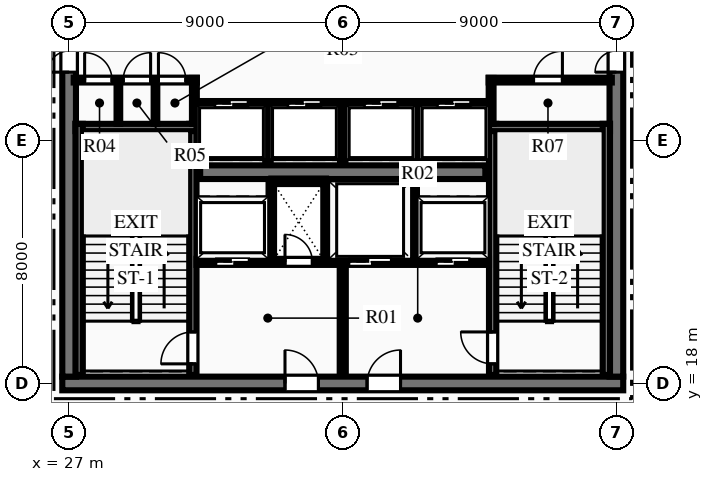
"""IFC4 building model, lengths in metres.
Left out: names, types, materials, properties, quantities, classifications, styles, units other than length and angle.
Written with IfcOpenShell. Run it as: python <this file> out.ifc"""

import sys

from ifc_helpers import new_model, si_unit, direction, frame, frame_2d, origin, place, context, subcontext, project, spatial, rectangle, extrude, element, fill, save


model = new_model("IFC4")
c1 = context("Model", 3, precision=1e-05, world=origin(), true_north=direction((0.0, 1.0)))
c2 = subcontext(c1, "Body", "Model", "MODEL_VIEW")
j1 = project(units=[si_unit("LENGTHUNIT", "METRE"), si_unit("PLANEANGLEUNIT", "RADIAN")], contexts=[c1])
p1 = place(None, origin())
s1 = spatial("IfcSite", under=j1, at=p1, CompositionType="ELEMENT")
p2 = place(p1, origin())
s2 = spatial("IfcBuilding", under=s1, at=p2, CompositionType="ELEMENT")
p3 = place(p2, frame((0.0, 0.0, 282.45)))
s3 = spatial("IfcBuildingStorey", under=s2, at=p3, CompositionType="ELEMENT", Elevation=282.45)
p4 = place(p3, frame((26.775, 18.0, 0.0), z_axis=(0.0, 0.0, 1.0), x_axis=(1.0, 0.0, 0.0)))
e1 = element("IfcWall", 1, at=p4, inside=s3, PredefinedType="SHEAR", context=c2, shape_type="SweptSolid", body=[
    extrude(rectangle(XDim=18.45, YDim=0.45, at=frame_2d((9.225, 0.0))), origin(), (0.0, 0.0, 1.0), 3.75),
])
p5 = place(p4, frame((7.325, 0.0, 0.0)))
e2 = element("IfcOpeningElement", 2, at=p5, cuts=e1, PredefinedType="OPENING", context=c2, shape_type="SweptSolid", body=[
    extrude(rectangle(XDim=1.1, YDim=2.15, at=frame_2d((0.55, 1.075))), frame((0.0, 0.235, 0.0), z_axis=(0.0, -1.0, 0.0), x_axis=(1.0, 0.0, 0.0)), (0.0, 0.0, 1.0), 0.47),
])
p6 = place(p4, frame((10.025, 0.0, 0.0)))
e3 = element("IfcOpeningElement", 3, at=p6, cuts=e1, PredefinedType="OPENING", context=c2, shape_type="SweptSolid", body=[
    extrude(rectangle(XDim=1.1, YDim=2.15, at=frame_2d((0.55, 1.075))), frame((0.0, 0.235, 0.0), z_axis=(0.0, -1.0, 0.0), x_axis=(1.0, 0.0, 0.0)), (0.0, 0.0, 1.0), 0.47),
])
p7 = place(p3, frame((27.0, 18.225, 0.0), z_axis=(0.0, 0.0, 1.0), x_axis=(0.0, 1.0, 0.0)))
e4 = element("IfcWall", 4, at=p7, inside=s3, PredefinedType="SHEAR", context=c2, shape_type="SweptSolid", body=[
    extrude(rectangle(XDim=15.55, YDim=0.45, at=frame_2d((7.775, 0.0))), origin(), (0.0, 0.0, 1.0), 3.75),
])
p8 = place(p7, frame((10.015, 0.0, 0.0)))
e5 = element("IfcOpeningElement", 5, at=p8, cuts=e4, PredefinedType="OPENING", context=c2, shape_type="SweptSolid", body=[
    extrude(rectangle(XDim=1.4, YDim=2.2, at=frame_2d((0.7, 1.1))), frame((0.0, 0.235, 0.0), z_axis=(0.0, -1.0, 0.0), x_axis=(1.0, 0.0, 0.0)), (0.0, 0.0, 1.0), 0.47),
])
p9 = place(p3, frame((45.0, 18.225, 0.0), z_axis=(0.0, 0.0, 1.0), x_axis=(0.0, 1.0, 0.0)))
e6 = element("IfcWall", 6, at=p9, inside=s3, PredefinedType="SHEAR", context=c2, shape_type="SweptSolid", body=[
    extrude(rectangle(XDim=15.55, YDim=0.45, at=frame_2d((7.775, 0.0))), origin(), (0.0, 0.0, 1.0), 3.75),
])
p10 = place(p9, frame((10.015, 0.0, 0.0)))
e7 = element("IfcOpeningElement", 7, at=p10, cuts=e6, PredefinedType="OPENING", context=c2, shape_type="SweptSolid", body=[
    extrude(rectangle(XDim=1.4, YDim=2.2, at=frame_2d((0.7, 1.1))), frame((0.0, 0.235, 0.0), z_axis=(0.0, -1.0, 0.0), x_axis=(1.0, 0.0, 0.0)), (0.0, 0.0, 1.0), 0.47),
])
p11 = place(p3, frame((31.31, 24.95, 0.0), z_axis=(0.0, 0.0, 1.0), x_axis=(1.0, 0.0, 0.0)))
e8 = element("IfcWall", 8, at=p11, inside=s3, PredefinedType="SHEAR", context=c2, shape_type="SweptSolid", body=[
    extrude(rectangle(XDim=9.38, YDim=0.45, at=frame_2d((4.69, 0.0))), origin(), (0.0, 0.0, 1.0), 3.75),
])
p12 = place(p3, frame((31.07, 18.28, 0.0), z_axis=(0.0, 0.0, 1.0), x_axis=(0.0, 1.0, 0.0)))
e9 = element("IfcWall", 9, at=p12, inside=s3, PredefinedType="SHEAR", context=c2, shape_type="SweptSolid", body=[
    extrude(rectangle(XDim=8.26, YDim=0.24, at=frame_2d((4.13, 0.0))), origin(), (0.0, 0.0, 1.0), 3.75),
])
p13 = place(p12, frame((0.365, 0.0, 0.0)))
e10 = element("IfcOpeningElement", 10, at=p13, cuts=e9, PredefinedType="OPENING", context=c2, shape_type="SweptSolid", body=[
    extrude(rectangle(XDim=1.05, YDim=2.15, at=frame_2d((0.525, 1.075))), frame((0.0, 0.13, 0.0), z_axis=(0.0, -1.0, 0.0), x_axis=(1.0, 0.0, 0.0)), (0.0, 0.0, 1.0), 0.26),
])
p14 = place(p3, frame((27.21, 26.42, 0.0), z_axis=(0.0, 0.0, 1.0), x_axis=(1.0, 0.0, 0.0)))
e11 = element("IfcWall", 11, at=p14, inside=s3, PredefinedType="SHEAR", context=c2, shape_type="SweptSolid", body=[
    extrude(rectangle(XDim=3.98, YDim=0.24, at=frame_2d((1.99, 0.0))), origin(), (0.0, 0.0, 1.0), 3.75),
])
p15 = place(p3, frame((27.33, 18.28, 0.0), z_axis=(0.0, 0.0, 1.0), x_axis=(0.0, 1.0, 0.0)))
e12 = element("IfcWall", 12, at=p15, inside=s3, PredefinedType="SHEAR", context=c2, shape_type="SweptSolid", body=[
    extrude(rectangle(XDim=8.26, YDim=0.24, at=frame_2d((4.13, 0.0))), origin(), (0.0, 0.0, 1.0), 3.75),
])
p16 = place(p3, frame((40.93, 18.28, 0.0), z_axis=(0.0, 0.0, 1.0), x_axis=(0.0, 1.0, 0.0)))
e13 = element("IfcWall", 13, at=p16, inside=s3, PredefinedType="SHEAR", context=c2, shape_type="SweptSolid", body=[
    extrude(rectangle(XDim=8.26, YDim=0.24, at=frame_2d((4.13, 0.0))), origin(), (0.0, 0.0, 1.0), 3.75),
])
p17 = place(p16, frame((0.365, 0.0, 0.0)))
e14 = element("IfcOpeningElement", 14, at=p17, cuts=e13, PredefinedType="OPENING", context=c2, shape_type="SweptSolid", body=[
    extrude(rectangle(XDim=1.05, YDim=2.15, at=frame_2d((0.525, 1.075))), frame((0.0, 0.13, 0.0), z_axis=(0.0, -1.0, 0.0), x_axis=(1.0, 0.0, 0.0)), (0.0, 0.0, 1.0), 0.26),
])
p18 = place(p3, frame((40.81, 26.42, 0.0), z_axis=(0.0, 0.0, 1.0), x_axis=(1.0, 0.0, 0.0)))
e15 = element("IfcWall", 15, at=p18, inside=s3, PredefinedType="SHEAR", context=c2, shape_type="SweptSolid", body=[
    extrude(rectangle(XDim=3.98, YDim=0.24, at=frame_2d((1.99, 0.0))), origin(), (0.0, 0.0, 1.0), 3.75),
])
p19 = place(p3, frame((44.67, 18.28, 0.0), z_axis=(0.0, 0.0, 1.0), x_axis=(0.0, 1.0, 0.0)))
e16 = element("IfcWall", 16, at=p19, inside=s3, PredefinedType="SHEAR", context=c2, shape_type="SweptSolid", body=[
    extrude(rectangle(XDim=8.26, YDim=0.24, at=frame_2d((4.13, 0.0))), origin(), (0.0, 0.0, 1.0), 3.75),
])
p20 = place(p3, frame((36.0, 18.28, 0.0), z_axis=(0.0, 0.0, 1.0), x_axis=(0.0, 1.0, 0.0)))
e17 = element("IfcWall", 17, at=p20, inside=s3, PredefinedType="PARTITIONING", context=c2, shape_type="SweptSolid", body=[
    extrude(rectangle(XDim=3.77, YDim=0.2, at=frame_2d((1.885, 0.0))), origin(), (0.0, 0.0, 1.0), 3.48),
])
p21 = place(p3, frame((31.19, 22.0, 0.0), z_axis=(0.0, 0.0, 1.0), x_axis=(1.0, 0.0, 0.0)))
e18 = element("IfcWall", 18, at=p21, inside=s3, PredefinedType="PARTITIONING", context=c2, shape_type="SweptSolid", body=[
    extrude(rectangle(XDim=4.69, YDim=0.2, at=frame_2d((2.345, 0.0))), origin(), (0.0, 0.0, 1.0), 3.48),
])
p22 = place(p21, frame((2.91, 0.0, 0.0)))
e19 = element("IfcOpeningElement", 19, at=p22, cuts=e18, PredefinedType="OPENING", context=c2, shape_type="SweptSolid", body=[
    extrude(rectangle(XDim=0.9, YDim=2.15, at=frame_2d((0.45, 1.075))), frame((0.0, 0.11, 0.0), z_axis=(0.0, -1.0, 0.0), x_axis=(1.0, 0.0, 0.0)), (0.0, 0.0, 1.0), 0.22),
])
p23 = place(p21, frame((0.635, 0.0, 0.0)))
e20 = element("IfcOpeningElement", 20, at=p23, cuts=e18, PredefinedType="OPENING", context=c2, shape_type="SweptSolid", body=[
    extrude(rectangle(XDim=1.1, YDim=2.15, at=frame_2d((0.55, 1.075))), frame((0.0, 0.11, 0.0), z_axis=(0.0, -1.0, 0.0), x_axis=(1.0, 0.0, 0.0)), (0.0, 0.0, 1.0), 0.22),
])
p24 = place(p3, frame((36.12, 22.0, 0.0), z_axis=(0.0, 0.0, 1.0), x_axis=(1.0, 0.0, 0.0)))
e21 = element("IfcWall", 21, at=p24, inside=s3, PredefinedType="PARTITIONING", context=c2, shape_type="SweptSolid", body=[
    extrude(rectangle(XDim=4.69, YDim=0.2, at=frame_2d((2.345, 0.0))), origin(), (0.0, 0.0, 1.0), 3.48),
])
p25 = place(p24, frame((2.955, 0.0, 0.0)))
e22 = element("IfcOpeningElement", 22, at=p25, cuts=e21, PredefinedType="OPENING", context=c2, shape_type="SweptSolid", body=[
    extrude(rectangle(XDim=1.1, YDim=2.15, at=frame_2d((0.55, 1.075))), frame((0.0, 0.11, 0.0), z_axis=(0.0, -1.0, 0.0), x_axis=(1.0, 0.0, 0.0)), (0.0, 0.0, 1.0), 0.22),
])
p26 = place(p24, frame((0.08, 0.0, 0.0)))
e23 = element("IfcOpeningElement", 23, at=p26, cuts=e21, PredefinedType="OPENING", context=c2, shape_type="SweptSolid", body=[
    extrude(rectangle(XDim=1.4, YDim=2.2, at=frame_2d((0.7, 1.1))), frame((0.0, 0.11, 0.0), z_axis=(0.0, -1.0, 0.0), x_axis=(1.0, 0.0, 0.0)), (0.0, 0.0, 1.0), 0.22),
])
for number, where, z_axis, x_axis in (
    (24, (33.65, 22.05, 0.0), (0.0, 0.0, 1.0), (0.0, 1.0, 0.0)),
    (25, (35.45, 22.05, 0.0), (0.0, 0.0, 1.0), (0.0, 1.0, 0.0)),
):
    element("IfcWall", number, at=place(p3, frame(where, z_axis=z_axis, x_axis=x_axis)), inside=s3, PredefinedType="PARTITIONING", context=c2, shape_type="SweptSolid", body=[
        extrude(rectangle(XDim=2.6, YDim=0.18, at=frame_2d((1.3, 0.0))), origin(), (0.0, 0.0, 1.0), 3.48),
    ])
p27 = place(p3, frame((33.65, 24.65, 0.0), z_axis=(0.0, 0.0, 1.0), x_axis=(1.0, 0.0, 0.0)))
e26 = element("IfcWall", 26, at=p27, inside=s3, PredefinedType="PARTITIONING", context=c2, shape_type="SweptSolid", body=[
    extrude(rectangle(XDim=1.8, YDim=0.18, at=frame_2d((0.9, 0.0))), origin(), (0.0, 0.0, 1.0), 3.48),
])
p28 = place(p3, frame((38.35, 22.05, 0.0), z_axis=(0.0, 0.0, 1.0), x_axis=(0.0, 1.0, 0.0)))
e27 = element("IfcWall", 27, at=p28, inside=s3, PredefinedType="PARTITIONING", context=c2, shape_type="SweptSolid", body=[
    extrude(rectangle(XDim=2.6, YDim=0.18, at=frame_2d((1.3, 0.0))), origin(), (0.0, 0.0, 1.0), 3.48),
])
p29 = place(p3, frame((27.15, 27.98, 0.0), z_axis=(0.0, 0.0, 1.0), x_axis=(1.0, 0.0, 0.0)))
e28 = element("IfcWall", 28, at=p29, inside=s3, PredefinedType="PARTITIONING", context=c2, shape_type="SweptSolid", body=[
    extrude(rectangle(XDim=4.05, YDim=0.16, at=frame_2d((2.025, 0.0))), origin(), (0.0, 0.0, 1.0), 3.48),
])
p30 = place(p29, frame((0.36, 0.0, 0.0)))
e29 = element("IfcOpeningElement", 29, at=p30, cuts=e28, PredefinedType="OPENING", context=c2, shape_type="SweptSolid", body=[
    extrude(rectangle(XDim=0.9, YDim=2.15, at=frame_2d((0.45, 1.075))), frame((0.0, 0.09, 0.0), z_axis=(0.0, -1.0, 0.0), x_axis=(1.0, 0.0, 0.0)), (0.0, 0.0, 1.0), 0.18),
])
p31 = place(p29, frame((1.63, 0.0, 0.0)))
e30 = element("IfcOpeningElement", 30, at=p31, cuts=e28, PredefinedType="OPENING", context=c2, shape_type="SweptSolid", body=[
    extrude(rectangle(XDim=0.9, YDim=2.15, at=frame_2d((0.45, 1.075))), frame((0.0, 0.09, 0.0), z_axis=(0.0, -1.0, 0.0), x_axis=(1.0, 0.0, 0.0)), (0.0, 0.0, 1.0), 0.18),
])
p32 = place(p29, frame((2.788, 0.0, 0.0)))
e31 = element("IfcOpeningElement", 31, at=p32, cuts=e28, PredefinedType="OPENING", context=c2, shape_type="SweptSolid", body=[
    extrude(rectangle(XDim=0.9, YDim=2.15, at=frame_2d((0.45, 1.075))), frame((0.0, 0.09, 0.0), z_axis=(0.0, -1.0, 0.0), x_axis=(1.0, 0.0, 0.0)), (0.0, 0.0, 1.0), 0.18),
])
p33 = place(p3, frame((31.12, 26.54, 0.0), z_axis=(0.0, 0.0, 1.0), x_axis=(0.0, 1.0, 0.0)))
e32 = element("IfcWall", 32, at=p33, inside=s3, PredefinedType="PARTITIONING", context=c2, shape_type="SweptSolid", body=[
    extrude(rectangle(XDim=1.51, YDim=0.16, at=frame_2d((0.755, 0.0))), origin(), (0.0, 0.0, 1.0), 3.48),
])
p34 = place(p3, frame((40.8, 27.98, 0.0), z_axis=(0.0, 0.0, 1.0), x_axis=(1.0, 0.0, 0.0)))
e33 = element("IfcWall", 33, at=p34, inside=s3, PredefinedType="PARTITIONING", context=c2, shape_type="SweptSolid", body=[
    extrude(rectangle(XDim=4.05, YDim=0.16, at=frame_2d((2.025, 0.0))), origin(), (0.0, 0.0, 1.0), 3.48),
])
p35 = place(p34, frame((1.475, 0.0, 0.0)))
e34 = element("IfcOpeningElement", 34, at=p35, cuts=e33, PredefinedType="OPENING", context=c2, shape_type="SweptSolid", body=[
    extrude(rectangle(XDim=0.95, YDim=2.15, at=frame_2d((0.475, 1.075))), frame((0.0, 0.09, 0.0), z_axis=(0.0, -1.0, 0.0), x_axis=(1.0, 0.0, 0.0)), (0.0, 0.0, 1.0), 0.18),
])
p36 = place(p3, frame((40.88, 26.54, 0.0), z_axis=(0.0, 0.0, 1.0), x_axis=(0.0, 1.0, 0.0)))
e35 = element("IfcWall", 35, at=p36, inside=s3, PredefinedType="PARTITIONING", context=c2, shape_type="SweptSolid", body=[
    extrude(rectangle(XDim=1.51, YDim=0.16, at=frame_2d((0.755, 0.0))), origin(), (0.0, 0.0, 1.0), 3.48),
])
for number, where, z_axis, x_axis in (
    (36, (28.62, 26.54, 0.0), (0.0, 0.0, 1.0), (0.0, 1.0, 0.0)),
    (37, (29.84, 26.54, 0.0), (0.0, 0.0, 1.0), (0.0, 1.0, 0.0)),
):
    element("IfcWall", number, at=place(p3, frame(where, z_axis=z_axis, x_axis=x_axis)), inside=s3, PredefinedType="PARTITIONING", context=c2, shape_type="SweptSolid", body=[
        extrude(rectangle(XDim=1.44, YDim=0.12, at=frame_2d((0.72, 0.0))), origin(), (0.0, 0.0, 1.0), 3.48),
    ])
p37 = place(p3, frame((31.2, 27.2, 0.0), z_axis=(0.0, 0.0, 1.0), x_axis=(1.0, 0.0, 0.0)))
e38 = element("IfcWall", 38, at=p37, inside=s3, PredefinedType="PARTITIONING", context=c2, shape_type="SweptSolid", body=[
    extrude(rectangle(XDim=9.6, YDim=0.18, at=frame_2d((4.8, 0.0))), origin(), (0.0, 0.0, 1.0), 3.48),
])
p38 = place(p37, frame((0.59, 0.0, 0.0)))
e39 = element("IfcOpeningElement", 39, at=p38, cuts=e38, PredefinedType="OPENING", context=c2, shape_type="SweptSolid", body=[
    extrude(rectangle(XDim=1.1, YDim=2.15, at=frame_2d((0.55, 1.075))), frame((0.0, 0.1, 0.0), z_axis=(0.0, -1.0, 0.0), x_axis=(1.0, 0.0, 0.0)), (0.0, 0.0, 1.0), 0.2),
])
p39 = place(p37, frame((2.99, 0.0, 0.0)))
e40 = element("IfcOpeningElement", 40, at=p39, cuts=e38, PredefinedType="OPENING", context=c2, shape_type="SweptSolid", body=[
    extrude(rectangle(XDim=1.1, YDim=2.15, at=frame_2d((0.55, 1.075))), frame((0.0, 0.1, 0.0), z_axis=(0.0, -1.0, 0.0), x_axis=(1.0, 0.0, 0.0)), (0.0, 0.0, 1.0), 0.2),
])
p40 = place(p37, frame((5.51, 0.0, 0.0)))
e41 = element("IfcOpeningElement", 41, at=p40, cuts=e38, PredefinedType="OPENING", context=c2, shape_type="SweptSolid", body=[
    extrude(rectangle(XDim=1.1, YDim=2.15, at=frame_2d((0.55, 1.075))), frame((0.0, 0.1, 0.0), z_axis=(0.0, -1.0, 0.0), x_axis=(1.0, 0.0, 0.0)), (0.0, 0.0, 1.0), 0.2),
])
p41 = place(p37, frame((7.91, 0.0, 0.0)))
e42 = element("IfcOpeningElement", 42, at=p41, cuts=e38, PredefinedType="OPENING", context=c2, shape_type="SweptSolid", body=[
    extrude(rectangle(XDim=1.1, YDim=2.15, at=frame_2d((0.55, 1.075))), frame((0.0, 0.1, 0.0), z_axis=(0.0, -1.0, 0.0), x_axis=(1.0, 0.0, 0.0)), (0.0, 0.0, 1.0), 0.2),
])
for number, where, z_axis, x_axis in (
    (43, (33.54, 25.3, 0.0), (0.0, 0.0, 1.0), (0.0, 1.0, 0.0)),
    (44, (36.0, 25.3, 0.0), (0.0, 0.0, 1.0), (0.0, 1.0, 0.0)),
    (45, (38.46, 25.3, 0.0), (0.0, 0.0, 1.0), (0.0, 1.0, 0.0)),
):
    element("IfcWall", number, at=place(p3, frame(where, z_axis=z_axis, x_axis=x_axis)), inside=s3, PredefinedType="PARTITIONING", context=c2, shape_type="SweptSolid", body=[
        extrude(rectangle(XDim=1.9, YDim=0.18, at=frame_2d((0.95, 0.0))), origin(), (0.0, 0.0, 1.0), 3.48),
    ])
p42 = place(p30, origin())
e46 = element("IfcDoor", 46, at=p42, inside=s3, OperationType="SINGLE_SWING_LEFT", PredefinedType="DOOR", context=c2, shape_type="SweptSolid", body=[
    extrude(rectangle(XDim=0.9, YDim=2.15, at=frame_2d((0.45, 1.075))), frame((0.0, 0.025, 0.0), z_axis=(0.0, -1.0, 0.0), x_axis=(1.0, 0.0, 0.0)), (0.0, 0.0, 1.0), 0.05),
])
fill(e29, e46)
p43 = place(p31, origin())
e47 = element("IfcDoor", 47, at=p43, inside=s3, OperationType="SINGLE_SWING_RIGHT", PredefinedType="DOOR", context=c2, shape_type="SweptSolid", body=[
    extrude(rectangle(XDim=0.9, YDim=2.15, at=frame_2d((0.45, 1.075))), frame((0.0, 0.025, 0.0), z_axis=(0.0, -1.0, 0.0), x_axis=(1.0, 0.0, 0.0)), (0.0, 0.0, 1.0), 0.05),
])
fill(e30, e47)
p44 = place(p32, origin())
e48 = element("IfcDoor", 48, at=p44, inside=s3, OperationType="SINGLE_SWING_LEFT", PredefinedType="DOOR", context=c2, shape_type="SweptSolid", body=[
    extrude(rectangle(XDim=0.9, YDim=2.15, at=frame_2d((0.45, 1.075))), frame((0.0, 0.025, 0.0), z_axis=(0.0, -1.0, 0.0), x_axis=(1.0, 0.0, 0.0)), (0.0, 0.0, 1.0), 0.05),
])
fill(e31, e48)
p45 = place(p35, origin())
e49 = element("IfcDoor", 49, at=p45, inside=s3, OperationType="SINGLE_SWING_RIGHT", PredefinedType="DOOR", context=c2, shape_type="SweptSolid", body=[
    extrude(rectangle(XDim=0.95, YDim=2.15, at=frame_2d((0.475, 1.075))), frame((0.0, 0.025, 0.0), z_axis=(0.0, -1.0, 0.0), x_axis=(1.0, 0.0, 0.0)), (0.0, 0.0, 1.0), 0.05),
])
fill(e34, e49)
p46 = place(p13, origin())
e50 = element("IfcDoor", 50, at=p46, inside=s3, OperationType="SINGLE_SWING_LEFT", PredefinedType="DOOR", context=c2, shape_type="SweptSolid", body=[
    extrude(rectangle(XDim=1.05, YDim=2.15, at=frame_2d((0.525, 1.075))), frame((0.0, 0.025, 0.0), z_axis=(0.0, -1.0, 0.0), x_axis=(1.0, 0.0, 0.0)), (0.0, 0.0, 1.0), 0.05),
])
fill(e10, e50)
p47 = place(p17, origin())
e51 = element("IfcDoor", 51, at=p47, inside=s3, OperationType="SINGLE_SWING_RIGHT", PredefinedType="DOOR", context=c2, shape_type="SweptSolid", body=[
    extrude(rectangle(XDim=1.05, YDim=2.15, at=frame_2d((0.525, 1.075))), frame((0.0, 0.025, 0.0), z_axis=(0.0, -1.0, 0.0), x_axis=(1.0, 0.0, 0.0)), (0.0, 0.0, 1.0), 0.05),
])
fill(e14, e51)
p48 = place(p5, origin())
e52 = element("IfcDoor", 52, at=p48, inside=s3, OperationType="SINGLE_SWING_LEFT", PredefinedType="DOOR", context=c2, shape_type="SweptSolid", body=[
    extrude(rectangle(XDim=1.1, YDim=2.15, at=frame_2d((0.55, 1.075))), frame((0.0, 0.025, 0.0), z_axis=(0.0, -1.0, 0.0), x_axis=(1.0, 0.0, 0.0)), (0.0, 0.0, 1.0), 0.05),
])
fill(e2, e52)
p49 = place(p6, origin())
e53 = element("IfcDoor", 53, at=p49, inside=s3, OperationType="SINGLE_SWING_RIGHT", PredefinedType="DOOR", context=c2, shape_type="SweptSolid", body=[
    extrude(rectangle(XDim=1.1, YDim=2.15, at=frame_2d((0.55, 1.075))), frame((0.0, 0.025, 0.0), z_axis=(0.0, -1.0, 0.0), x_axis=(1.0, 0.0, 0.0)), (0.0, 0.0, 1.0), 0.05),
])
fill(e3, e53)
p50 = place(p22, origin())
e54 = element("IfcDoor", 54, at=p50, inside=s3, OperationType="SINGLE_SWING_LEFT", PredefinedType="DOOR", context=c2, shape_type="SweptSolid", body=[
    extrude(rectangle(XDim=0.9, YDim=2.15, at=frame_2d((0.45, 1.075))), frame((0.0, 0.025, 0.0), z_axis=(0.0, -1.0, 0.0), x_axis=(1.0, 0.0, 0.0)), (0.0, 0.0, 1.0), 0.05),
])
fill(e19, e54)
p51 = place(p8, origin())
e55 = element("IfcDoor", 55, at=p51, inside=s3, OperationType="DOUBLE_DOOR_SINGLE_SWING", PredefinedType="DOOR", context=c2, shape_type="SweptSolid", body=[
    extrude(rectangle(XDim=1.4, YDim=2.2, at=frame_2d((0.7, 1.1))), frame((0.0, 0.025, 0.0), z_axis=(0.0, -1.0, 0.0), x_axis=(1.0, 0.0, 0.0)), (0.0, 0.0, 1.0), 0.05),
])
fill(e5, e55)
p52 = place(p10, origin())
e56 = element("IfcDoor", 56, at=p52, inside=s3, OperationType="DOUBLE_DOOR_SINGLE_SWING", PredefinedType="DOOR", context=c2, shape_type="SweptSolid", body=[
    extrude(rectangle(XDim=1.4, YDim=2.2, at=frame_2d((0.7, 1.1))), frame((0.0, 0.025, 0.0), z_axis=(0.0, -1.0, 0.0), x_axis=(1.0, 0.0, 0.0)), (0.0, 0.0, 1.0), 0.05),
])
fill(e7, e56)
p53 = place(p38, origin())
e57 = element("IfcDoor", 57, at=p53, inside=s3, OperationType="SLIDING_TO_LEFT", PredefinedType="DOOR", context=c2, shape_type="SweptSolid", body=[
    extrude(rectangle(XDim=1.1, YDim=2.15, at=frame_2d((0.55, 1.075))), frame((0.0, 0.025, 0.0), z_axis=(0.0, -1.0, 0.0), x_axis=(1.0, 0.0, 0.0)), (0.0, 0.0, 1.0), 0.05),
])
fill(e39, e57)
p54 = place(p39, origin())
e58 = element("IfcDoor", 58, at=p54, inside=s3, OperationType="SLIDING_TO_LEFT", PredefinedType="DOOR", context=c2, shape_type="SweptSolid", body=[
    extrude(rectangle(XDim=1.1, YDim=2.15, at=frame_2d((0.55, 1.075))), frame((0.0, 0.025, 0.0), z_axis=(0.0, -1.0, 0.0), x_axis=(1.0, 0.0, 0.0)), (0.0, 0.0, 1.0), 0.05),
])
fill(e40, e58)
p55 = place(p40, origin())
e59 = element("IfcDoor", 59, at=p55, inside=s3, OperationType="SLIDING_TO_LEFT", PredefinedType="DOOR", context=c2, shape_type="SweptSolid", body=[
    extrude(rectangle(XDim=1.1, YDim=2.15, at=frame_2d((0.55, 1.075))), frame((0.0, 0.025, 0.0), z_axis=(0.0, -1.0, 0.0), x_axis=(1.0, 0.0, 0.0)), (0.0, 0.0, 1.0), 0.05),
])
fill(e41, e59)
p56 = place(p41, origin())
e60 = element("IfcDoor", 60, at=p56, inside=s3, OperationType="SLIDING_TO_LEFT", PredefinedType="DOOR", context=c2, shape_type="SweptSolid", body=[
    extrude(rectangle(XDim=1.1, YDim=2.15, at=frame_2d((0.55, 1.075))), frame((0.0, 0.025, 0.0), z_axis=(0.0, -1.0, 0.0), x_axis=(1.0, 0.0, 0.0)), (0.0, 0.0, 1.0), 0.05),
])
fill(e42, e60)
p57 = place(p23, origin())
e61 = element("IfcDoor", 61, at=p57, inside=s3, OperationType="SLIDING_TO_LEFT", PredefinedType="DOOR", context=c2, shape_type="SweptSolid", body=[
    extrude(rectangle(XDim=1.1, YDim=2.15, at=frame_2d((0.55, 1.075))), frame((0.0, 0.025, 0.0), z_axis=(0.0, -1.0, 0.0), x_axis=(1.0, 0.0, 0.0)), (0.0, 0.0, 1.0), 0.05),
])
fill(e20, e61)
p58 = place(p25, origin())
e62 = element("IfcDoor", 62, at=p58, inside=s3, OperationType="SLIDING_TO_LEFT", PredefinedType="DOOR", context=c2, shape_type="SweptSolid", body=[
    extrude(rectangle(XDim=1.1, YDim=2.15, at=frame_2d((0.55, 1.075))), frame((0.0, 0.025, 0.0), z_axis=(0.0, -1.0, 0.0), x_axis=(1.0, 0.0, 0.0)), (0.0, 0.0, 1.0), 0.05),
])
fill(e22, e62)
p59 = place(p26, origin())
e63 = element("IfcDoor", 63, at=p59, inside=s3, OperationType="SLIDING_TO_LEFT", PredefinedType="DOOR", context=c2, shape_type="SweptSolid", body=[
    extrude(rectangle(XDim=1.4, YDim=2.2, at=frame_2d((0.7, 1.1))), frame((0.0, 0.025, 0.0), z_axis=(0.0, -1.0, 0.0), x_axis=(1.0, 0.0, 0.0)), (0.0, 0.0, 1.0), 0.05),
])
fill(e23, e63)
save(model, sys.argv[1])
